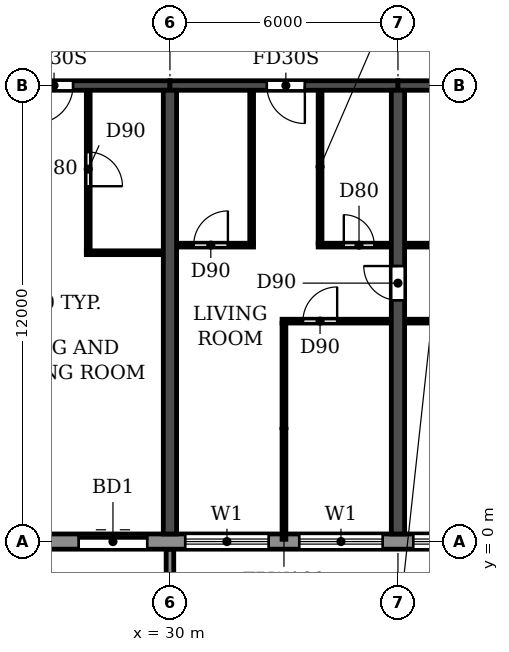
"""IFC4 building model, lengths in metres.
Left out: names, types, materials, properties, quantities, classifications, styles, units other than length and angle.
Written with IfcOpenShell. Run it as: python <this file> out.ifc"""

import sys

from ifc_helpers import new_model, si_unit, direction, frame, frame_2d, origin, place, context, subcontext, project, spatial, polyline, rectangle, outline, extrude, source, transform, mapped, element, fill, save


model = new_model("IFC4")
c1 = context("Model", 3, precision=1e-05, world=origin(), true_north=direction((0.0, 1.0)))
c2 = subcontext(c1, "Body", "Model", "MODEL_VIEW")
j1 = project(units=[si_unit("LENGTHUNIT", "METRE"), si_unit("PLANEANGLEUNIT", "RADIAN")], contexts=[c1])
p1 = place(None, origin())
s1 = spatial("IfcSite", under=j1, at=p1, CompositionType="ELEMENT")
p2 = place(p1, origin())
s2 = spatial("IfcBuilding", under=s1, at=p2, CompositionType="ELEMENT")
p3 = place(p2, frame((0.0, 0.0, 109.2)))
s3 = spatial("IfcBuildingStorey", under=s2, at=p3, CompositionType="ELEMENT", Elevation=109.2)
p4 = place(p3, frame((30.0, 0.2, 0.0), z_axis=(0.0, 0.0, 1.0), x_axis=(0.0, 1.0, 0.0)))
e1 = element("IfcWall", 1, at=p4, inside=s3, PredefinedType="SHEAR", context=c2, shape_type="SweptSolid", body=[
    extrude(rectangle(XDim=11.675, YDim=0.35, at=frame_2d((5.837, 0.0))), origin(), (0.0, 0.0, 1.0), 3.06),
])
p5 = place(p3, frame((36.0, 0.2, 0.0), z_axis=(0.0, 0.0, 1.0), x_axis=(0.0, 1.0, 0.0)))
e2 = element("IfcWall", 2, at=p5, inside=s3, PredefinedType="SHEAR", context=c2, shape_type="SweptSolid", body=[
    extrude(rectangle(XDim=11.675, YDim=0.35, at=frame_2d((5.837, 0.0))), origin(), (0.0, 0.0, 1.0), 3.06),
])
p6 = place(p5, frame((6.15, 0.0, 0.0)))
e3 = element("IfcOpeningElement", 3, at=p6, cuts=e2, PredefinedType="OPENING", context=c2, shape_type="SweptSolid", body=[
    extrude(rectangle(XDim=0.9, YDim=2.1, at=frame_2d((0.45, 1.05))), frame((0.0, 0.185, 0.0), z_axis=(0.0, -1.0, 0.0), x_axis=(1.0, 0.0, 0.0)), (0.0, 0.0, 1.0), 0.37),
])
p7 = place(p3, frame((24.0, 12.0, 0.0), z_axis=(0.0, 0.0, 1.0), x_axis=(1.0, 0.0, 0.0)))
e4 = element("IfcWall", 4, at=p7, inside=s3, PredefinedType="SHEAR", context=c2, shape_type="SweptSolid", body=[
    extrude(rectangle(XDim=6.0, YDim=0.25, at=frame_2d((3.0, 0.0))), origin(), (0.0, 0.0, 1.0), 2.46),
])
p8 = place(p7, frame((2.45, 0.0, 0.0)))
e5 = element("IfcOpeningElement", 5, at=p8, cuts=e4, PredefinedType="OPENING", context=c2, shape_type="SweptSolid", body=[
    extrude(rectangle(XDim=1.0, YDim=2.1, at=frame_2d((0.5, 1.05))), frame((0.0, 0.135, 0.0), z_axis=(0.0, -1.0, 0.0), x_axis=(1.0, 0.0, 0.0)), (0.0, 0.0, 1.0), 0.27),
])
p9 = place(p3, frame((30.0, 12.0, 0.0), z_axis=(0.0, 0.0, 1.0), x_axis=(1.0, 0.0, 0.0)))
e6 = element("IfcWall", 6, at=p9, inside=s3, PredefinedType="SHEAR", context=c2, shape_type="SweptSolid", body=[
    extrude(rectangle(XDim=6.0, YDim=0.25, at=frame_2d((3.0, 0.0))), origin(), (0.0, 0.0, 1.0), 2.46),
])
p10 = place(p9, frame((2.55, 0.0, 0.0)))
e7 = element("IfcOpeningElement", 7, at=p10, cuts=e6, PredefinedType="OPENING", context=c2, shape_type="SweptSolid", body=[
    extrude(rectangle(XDim=1.0, YDim=2.1, at=frame_2d((0.5, 1.05))), frame((0.0, 0.135, 0.0), z_axis=(0.0, -1.0, 0.0), x_axis=(1.0, 0.0, 0.0)), (0.0, 0.0, 1.0), 0.27),
])
p11 = place(p3, frame((36.0, 12.0, 0.0), z_axis=(0.0, 0.0, 1.0), x_axis=(1.0, 0.0, 0.0)))
e8 = element("IfcWall", 8, at=p11, inside=s3, PredefinedType="SHEAR", context=c2, shape_type="SweptSolid", body=[
    extrude(rectangle(XDim=6.0, YDim=0.25, at=frame_2d((3.0, 0.0))), origin(), (0.0, 0.0, 1.0), 2.46),
])
p12 = place(p3, frame((16.683, 0.0, 0.0), z_axis=(0.0, 0.0, 1.0), x_axis=(1.0, 0.0, 0.0)))
e9 = element("IfcWall", 9, at=p12, inside=s3, PredefinedType="STANDARD", context=c2, shape_type="SweptSolid", body=[
    extrude(rectangle(XDim=68.634, YDim=0.4, at=frame_2d((34.317, 0.0))), origin(), (0.0, 0.0, 1.0), 3.06),
])
p13 = place(p12, frame((1.717, 0.0, 0.9)))
e10 = element("IfcOpeningElement", 10, at=p13, cuts=e9, PredefinedType="OPENING", context=c2, shape_type="SweptSolid", body=[
    extrude(rectangle(XDim=2.2, YDim=1.5, at=frame_2d((1.1, 0.75))), frame((0.0, 0.21, 0.0), z_axis=(0.0, -1.0, 0.0), x_axis=(1.0, 0.0, 0.0)), (0.0, 0.0, 1.0), 0.42),
])
p14 = place(p12, frame((4.717, 0.0, 0.9)))
e11 = element("IfcOpeningElement", 11, at=p14, cuts=e9, PredefinedType="OPENING", context=c2, shape_type="SweptSolid", body=[
    extrude(rectangle(XDim=2.2, YDim=1.5, at=frame_2d((1.1, 0.75))), frame((0.0, 0.21, 0.0), z_axis=(0.0, -1.0, 0.0), x_axis=(1.0, 0.0, 0.0)), (0.0, 0.0, 1.0), 0.42),
])
p15 = place(p12, frame((7.717, 0.0, 0.9)))
e12 = element("IfcOpeningElement", 12, at=p15, cuts=e9, PredefinedType="OPENING", context=c2, shape_type="SweptSolid", body=[
    extrude(rectangle(XDim=2.2, YDim=1.5, at=frame_2d((1.1, 0.75))), frame((0.0, 0.21, 0.0), z_axis=(0.0, -1.0, 0.0), x_axis=(1.0, 0.0, 0.0)), (0.0, 0.0, 1.0), 0.42),
])
p16 = place(p12, frame((10.917, 0.0, 0.0)))
e13 = element("IfcOpeningElement", 13, at=p16, cuts=e9, PredefinedType="OPENING", context=c2, shape_type="SweptSolid", body=[
    extrude(rectangle(XDim=1.8, YDim=2.4, at=frame_2d((0.9, 1.2))), frame((0.0, 0.21, 0.0), z_axis=(0.0, -1.0, 0.0), x_axis=(1.0, 0.0, 0.0)), (0.0, 0.0, 1.0), 0.42),
])
p17 = place(p12, frame((13.717, 0.0, 0.9)))
e14 = element("IfcOpeningElement", 14, at=p17, cuts=e9, PredefinedType="OPENING", context=c2, shape_type="SweptSolid", body=[
    extrude(rectangle(XDim=2.2, YDim=1.5, at=frame_2d((1.1, 0.75))), frame((0.0, 0.21, 0.0), z_axis=(0.0, -1.0, 0.0), x_axis=(1.0, 0.0, 0.0)), (0.0, 0.0, 1.0), 0.42),
])
p18 = place(p12, frame((16.717, 0.0, 0.9)))
e15 = element("IfcOpeningElement", 15, at=p18, cuts=e9, PredefinedType="OPENING", context=c2, shape_type="SweptSolid", body=[
    extrude(rectangle(XDim=2.2, YDim=1.5, at=frame_2d((1.1, 0.75))), frame((0.0, 0.21, 0.0), z_axis=(0.0, -1.0, 0.0), x_axis=(1.0, 0.0, 0.0)), (0.0, 0.0, 1.0), 0.42),
])
p19 = place(p12, frame((19.717, 0.0, 0.9)))
e16 = element("IfcOpeningElement", 16, at=p19, cuts=e9, PredefinedType="OPENING", context=c2, shape_type="SweptSolid", body=[
    extrude(rectangle(XDim=2.2, YDim=1.5, at=frame_2d((1.1, 0.75))), frame((0.0, 0.21, 0.0), z_axis=(0.0, -1.0, 0.0), x_axis=(1.0, 0.0, 0.0)), (0.0, 0.0, 1.0), 0.42),
])
p20 = place(p12, frame((22.717, 0.0, 0.9)))
e17 = element("IfcOpeningElement", 17, at=p20, cuts=e9, PredefinedType="OPENING", context=c2, shape_type="SweptSolid", body=[
    extrude(rectangle(XDim=2.2, YDim=1.5, at=frame_2d((1.1, 0.75))), frame((0.0, 0.21, 0.0), z_axis=(0.0, -1.0, 0.0), x_axis=(1.0, 0.0, 0.0)), (0.0, 0.0, 1.0), 0.42),
])
p21 = place(p12, frame((25.717, 0.0, 0.9)))
e18 = element("IfcOpeningElement", 18, at=p21, cuts=e9, PredefinedType="OPENING", context=c2, shape_type="SweptSolid", body=[
    extrude(rectangle(XDim=2.2, YDim=1.5, at=frame_2d((1.1, 0.75))), frame((0.0, 0.21, 0.0), z_axis=(0.0, -1.0, 0.0), x_axis=(1.0, 0.0, 0.0)), (0.0, 0.0, 1.0), 0.42),
])
p22 = place(p12, frame((28.717, 0.0, 0.9)))
e19 = element("IfcOpeningElement", 19, at=p22, cuts=e9, PredefinedType="OPENING", context=c2, shape_type="SweptSolid", body=[
    extrude(rectangle(XDim=2.2, YDim=1.5, at=frame_2d((1.1, 0.75))), frame((0.0, 0.21, 0.0), z_axis=(0.0, -1.0, 0.0), x_axis=(1.0, 0.0, 0.0)), (0.0, 0.0, 1.0), 0.42),
])
p23 = place(p12, frame((31.917, 0.0, 0.0)))
e20 = element("IfcOpeningElement", 20, at=p23, cuts=e9, PredefinedType="OPENING", context=c2, shape_type="SweptSolid", body=[
    extrude(rectangle(XDim=1.8, YDim=2.4, at=frame_2d((0.9, 1.2))), frame((0.0, 0.21, 0.0), z_axis=(0.0, -1.0, 0.0), x_axis=(1.0, 0.0, 0.0)), (0.0, 0.0, 1.0), 0.42),
])
p24 = place(p12, frame((34.717, 0.0, 0.9)))
e21 = element("IfcOpeningElement", 21, at=p24, cuts=e9, PredefinedType="OPENING", context=c2, shape_type="SweptSolid", body=[
    extrude(rectangle(XDim=2.2, YDim=1.5, at=frame_2d((1.1, 0.75))), frame((0.0, 0.21, 0.0), z_axis=(0.0, -1.0, 0.0), x_axis=(1.0, 0.0, 0.0)), (0.0, 0.0, 1.0), 0.42),
])
p25 = place(p12, frame((37.717, 0.0, 0.9)))
e22 = element("IfcOpeningElement", 22, at=p25, cuts=e9, PredefinedType="OPENING", context=c2, shape_type="SweptSolid", body=[
    extrude(rectangle(XDim=2.2, YDim=1.5, at=frame_2d((1.1, 0.75))), frame((0.0, 0.21, 0.0), z_axis=(0.0, -1.0, 0.0), x_axis=(1.0, 0.0, 0.0)), (0.0, 0.0, 1.0), 0.42),
])
p26 = place(p12, frame((40.717, 0.0, 0.9)))
e23 = element("IfcOpeningElement", 23, at=p26, cuts=e9, PredefinedType="OPENING", context=c2, shape_type="SweptSolid", body=[
    extrude(rectangle(XDim=2.2, YDim=1.5, at=frame_2d((1.1, 0.75))), frame((0.0, 0.21, 0.0), z_axis=(0.0, -1.0, 0.0), x_axis=(1.0, 0.0, 0.0)), (0.0, 0.0, 1.0), 0.42),
])
p27 = place(p12, frame((43.717, 0.0, 0.9)))
e24 = element("IfcOpeningElement", 24, at=p27, cuts=e9, PredefinedType="OPENING", context=c2, shape_type="SweptSolid", body=[
    extrude(rectangle(XDim=2.2, YDim=1.5, at=frame_2d((1.1, 0.75))), frame((0.0, 0.21, 0.0), z_axis=(0.0, -1.0, 0.0), x_axis=(1.0, 0.0, 0.0)), (0.0, 0.0, 1.0), 0.42),
])
p28 = place(p12, frame((46.917, 0.0, 0.0)))
e25 = element("IfcOpeningElement", 25, at=p28, cuts=e9, PredefinedType="OPENING", context=c2, shape_type="SweptSolid", body=[
    extrude(rectangle(XDim=1.8, YDim=2.4, at=frame_2d((0.9, 1.2))), frame((0.0, 0.21, 0.0), z_axis=(0.0, -1.0, 0.0), x_axis=(1.0, 0.0, 0.0)), (0.0, 0.0, 1.0), 0.42),
])
p29 = place(p12, frame((49.717, 0.0, 0.9)))
e26 = element("IfcOpeningElement", 26, at=p29, cuts=e9, PredefinedType="OPENING", context=c2, shape_type="SweptSolid", body=[
    extrude(rectangle(XDim=2.2, YDim=1.5, at=frame_2d((1.1, 0.75))), frame((0.0, 0.21, 0.0), z_axis=(0.0, -1.0, 0.0), x_axis=(1.0, 0.0, 0.0)), (0.0, 0.0, 1.0), 0.42),
])
p30 = place(p12, frame((52.717, 0.0, 0.9)))
e27 = element("IfcOpeningElement", 27, at=p30, cuts=e9, PredefinedType="OPENING", context=c2, shape_type="SweptSolid", body=[
    extrude(rectangle(XDim=2.2, YDim=1.5, at=frame_2d((1.1, 0.75))), frame((0.0, 0.21, 0.0), z_axis=(0.0, -1.0, 0.0), x_axis=(1.0, 0.0, 0.0)), (0.0, 0.0, 1.0), 0.42),
])
p31 = place(p12, frame((55.717, 0.0, 0.9)))
e28 = element("IfcOpeningElement", 28, at=p31, cuts=e9, PredefinedType="OPENING", context=c2, shape_type="SweptSolid", body=[
    extrude(rectangle(XDim=2.2, YDim=1.5, at=frame_2d((1.1, 0.75))), frame((0.0, 0.21, 0.0), z_axis=(0.0, -1.0, 0.0), x_axis=(1.0, 0.0, 0.0)), (0.0, 0.0, 1.0), 0.42),
])
p32 = place(p12, frame((58.717, 0.0, 0.9)))
e29 = element("IfcOpeningElement", 29, at=p32, cuts=e9, PredefinedType="OPENING", context=c2, shape_type="SweptSolid", body=[
    extrude(rectangle(XDim=2.2, YDim=1.5, at=frame_2d((1.1, 0.75))), frame((0.0, 0.21, 0.0), z_axis=(0.0, -1.0, 0.0), x_axis=(1.0, 0.0, 0.0)), (0.0, 0.0, 1.0), 0.42),
])
p33 = place(p12, frame((61.717, 0.0, 0.9)))
e30 = element("IfcOpeningElement", 30, at=p33, cuts=e9, PredefinedType="OPENING", context=c2, shape_type="SweptSolid", body=[
    extrude(rectangle(XDim=2.2, YDim=1.5, at=frame_2d((1.1, 0.75))), frame((0.0, 0.21, 0.0), z_axis=(0.0, -1.0, 0.0), x_axis=(1.0, 0.0, 0.0)), (0.0, 0.0, 1.0), 0.42),
])
p34 = place(p12, frame((64.717, 0.0, 0.9)))
e31 = element("IfcOpeningElement", 31, at=p34, cuts=e9, PredefinedType="OPENING", context=c2, shape_type="SweptSolid", body=[
    extrude(rectangle(XDim=2.2, YDim=1.5, at=frame_2d((1.1, 0.75))), frame((0.0, 0.21, 0.0), z_axis=(0.0, -1.0, 0.0), x_axis=(1.0, 0.0, 0.0)), (0.0, 0.0, 1.0), 0.42),
])
m1 = source(origin(), c2, "Body", "SweptSolid", [
    extrude(outline(polyline([(0.0, 0.0), (0.2, 0.0), (0.2, 1.65), (0.0, 1.65), (0.0, 0.0)])), origin(), (0.0, 0.0, 1.0), 3.1),
])
p35 = place(p3, frame((29.9, -1.85, 0.0)))
e32 = element("IfcWall", 32, at=p35, inside=s3, PredefinedType="STANDARD", context=c2, shape_type="MappedRepresentation", body=[
    mapped(m1, transform((0.0, 0.0, 0.0))),
])
p36 = place(p3, frame((32.95, 5.8, 0.0), z_axis=(0.0, 0.0, 1.0), x_axis=(1.0, 0.0, 0.0)))
e33 = element("IfcWall", 33, at=p36, inside=s3, PredefinedType="PARTITIONING", context=c2, shape_type="SweptSolid", body=[
    extrude(rectangle(XDim=2.865, YDim=0.1, at=frame_2d((1.433, 0.0))), origin(), (0.0, 0.0, 1.0), 3.06),
])
p37 = place(p36, frame((0.55, 0.0, 0.0)))
e34 = element("IfcOpeningElement", 34, at=p37, cuts=e33, PredefinedType="OPENING", context=c2, shape_type="SweptSolid", body=[
    extrude(rectangle(XDim=0.9, YDim=2.1, at=frame_2d((0.45, 1.05))), frame((0.0, 0.06, 0.0), z_axis=(0.0, -1.0, 0.0), x_axis=(1.0, 0.0, 0.0)), (0.0, 0.0, 1.0), 0.12),
])
p38 = place(p3, frame((36.185, 5.8, 0.0), z_axis=(0.0, 0.0, 1.0), x_axis=(1.0, 0.0, 0.0)))
e35 = element("IfcWall", 35, at=p38, inside=s3, PredefinedType="PARTITIONING", context=c2, shape_type="SweptSolid", body=[
    extrude(rectangle(XDim=5.63, YDim=0.1, at=frame_2d((2.815, 0.0))), origin(), (0.0, 0.0, 1.0), 3.06),
])
p39 = place(p38, frame((1.415, 0.0, 0.0)))
e36 = element("IfcOpeningElement", 36, at=p39, cuts=e35, PredefinedType="OPENING", context=c2, shape_type="SweptSolid", body=[
    extrude(rectangle(XDim=0.9, YDim=2.1, at=frame_2d((0.45, 1.05))), frame((0.0, 0.06, 0.0), z_axis=(0.0, -1.0, 0.0), x_axis=(1.0, 0.0, 0.0)), (0.0, 0.0, 1.0), 0.12),
])
p40 = place(p38, frame((3.315, 0.0, 0.0)))
e37 = element("IfcOpeningElement", 37, at=p40, cuts=e35, PredefinedType="OPENING", context=c2, shape_type="SweptSolid", body=[
    extrude(rectangle(XDim=0.9, YDim=2.1, at=frame_2d((0.45, 1.05))), frame((0.0, 0.06, 0.0), z_axis=(0.0, -1.0, 0.0), x_axis=(1.0, 0.0, 0.0)), (0.0, 0.0, 1.0), 0.12),
])
p41 = place(p3, frame((27.8, 7.6, 0.0), z_axis=(0.0, 0.0, 1.0), x_axis=(1.0, 0.0, 0.0)))
e38 = element("IfcWall", 38, at=p41, inside=s3, PredefinedType="PARTITIONING", context=c2, shape_type="SweptSolid", body=[
    extrude(rectangle(XDim=2.015, YDim=0.1, at=frame_2d((1.007, 0.0))), origin(), (0.0, 0.0, 1.0), 3.06),
])
p42 = place(p3, frame((30.185, 7.8, 0.0), z_axis=(0.0, 0.0, 1.0), x_axis=(1.0, 0.0, 0.0)))
e39 = element("IfcWall", 39, at=p42, inside=s3, PredefinedType="PARTITIONING", context=c2, shape_type="SweptSolid", body=[
    extrude(rectangle(XDim=2.015, YDim=0.1, at=frame_2d((1.007, 0.0))), origin(), (0.0, 0.0, 1.0), 3.06),
])
p43 = place(p42, frame((0.44, 0.0, 0.0)))
e40 = element("IfcOpeningElement", 40, at=p43, cuts=e39, PredefinedType="OPENING", context=c2, shape_type="SweptSolid", body=[
    extrude(rectangle(XDim=0.9, YDim=2.1, at=frame_2d((0.45, 1.05))), frame((0.0, 0.06, 0.0), z_axis=(0.0, -1.0, 0.0), x_axis=(1.0, 0.0, 0.0)), (0.0, 0.0, 1.0), 0.12),
])
p44 = place(p3, frame((33.9, 7.8, 0.0), z_axis=(0.0, 0.0, 1.0), x_axis=(1.0, 0.0, 0.0)))
e41 = element("IfcWall", 41, at=p44, inside=s3, PredefinedType="PARTITIONING", context=c2, shape_type="SweptSolid", body=[
    extrude(rectangle(XDim=1.915, YDim=0.1, at=frame_2d((0.958, 0.0))), origin(), (0.0, 0.0, 1.0), 3.06),
])
p45 = place(p44, frame((0.675, 0.0, 0.0)))
e42 = element("IfcOpeningElement", 42, at=p45, cuts=e41, PredefinedType="OPENING", context=c2, shape_type="SweptSolid", body=[
    extrude(rectangle(XDim=0.8, YDim=2.1, at=frame_2d((0.4, 1.05))), frame((0.0, 0.06, 0.0), z_axis=(0.0, -1.0, 0.0), x_axis=(1.0, 0.0, 0.0)), (0.0, 0.0, 1.0), 0.12),
])
p46 = place(p3, frame((36.185, 7.8, 0.0), z_axis=(0.0, 0.0, 1.0), x_axis=(1.0, 0.0, 0.0)))
e43 = element("IfcWall", 43, at=p46, inside=s3, PredefinedType="PARTITIONING", context=c2, shape_type="SweptSolid", body=[
    extrude(rectangle(XDim=5.63, YDim=0.1, at=frame_2d((2.815, 0.0))), origin(), (0.0, 0.0, 1.0), 3.06),
])
p47 = place(p46, frame((0.765, 0.0, 0.0)))
e44 = element("IfcOpeningElement", 44, at=p47, cuts=e43, PredefinedType="OPENING", context=c2, shape_type="SweptSolid", body=[
    extrude(rectangle(XDim=0.8, YDim=2.1, at=frame_2d((0.4, 1.05))), frame((0.0, 0.06, 0.0), z_axis=(0.0, -1.0, 0.0), x_axis=(1.0, 0.0, 0.0)), (0.0, 0.0, 1.0), 0.12),
])
p48 = place(p46, frame((3.765, 0.0, 0.0)))
e45 = element("IfcOpeningElement", 45, at=p48, cuts=e43, PredefinedType="OPENING", context=c2, shape_type="SweptSolid", body=[
    extrude(rectangle(XDim=0.8, YDim=2.1, at=frame_2d((0.4, 1.05))), frame((0.0, 0.06, 0.0), z_axis=(0.0, -1.0, 0.0), x_axis=(1.0, 0.0, 0.0)), (0.0, 0.0, 1.0), 0.12),
])
p49 = place(p3, frame((27.85, 7.65, 0.0), z_axis=(0.0, 0.0, 1.0), x_axis=(0.0, 1.0, 0.0)))
e46 = element("IfcWall", 46, at=p49, inside=s3, PredefinedType="PARTITIONING", context=c2, shape_type="SweptSolid", body=[
    extrude(rectangle(XDim=4.215, YDim=0.1, at=frame_2d((2.107, 0.0))), origin(), (0.0, 0.0, 1.0), 3.06),
])
p50 = place(p49, frame((1.7, 0.0, 0.0)))
e47 = element("IfcOpeningElement", 47, at=p50, cuts=e46, PredefinedType="OPENING", context=c2, shape_type="SweptSolid", body=[
    extrude(rectangle(XDim=0.9, YDim=2.1, at=frame_2d((0.45, 1.05))), frame((0.0, 0.06, 0.0), z_axis=(0.0, -1.0, 0.0), x_axis=(1.0, 0.0, 0.0)), (0.0, 0.0, 1.0), 0.12),
])
p51 = place(p3, frame((32.15, 7.85, 0.0), z_axis=(0.0, 0.0, 1.0), x_axis=(0.0, 1.0, 0.0)))
e48 = element("IfcWall", 48, at=p51, inside=s3, PredefinedType="PARTITIONING", context=c2, shape_type="SweptSolid", body=[
    extrude(rectangle(XDim=4.015, YDim=0.1, at=frame_2d((2.007, 0.0))), origin(), (0.0, 0.0, 1.0), 3.06),
])
p52 = place(p3, frame((33.0, 0.06, 0.0), z_axis=(0.0, 0.0, 1.0), x_axis=(0.0, 1.0, 0.0)))
e49 = element("IfcWall", 49, at=p52, inside=s3, PredefinedType="PARTITIONING", context=c2, shape_type="SweptSolid", body=[
    extrude(rectangle(XDim=5.69, YDim=0.1, at=frame_2d((2.845, 0.0))), origin(), (0.0, 0.0, 1.0), 3.06),
])
p53 = place(p3, frame((33.95, 7.85, 0.0), z_axis=(0.0, 0.0, 1.0), x_axis=(0.0, 1.0, 0.0)))
e50 = element("IfcWall", 50, at=p53, inside=s3, PredefinedType="PARTITIONING", context=c2, shape_type="SweptSolid", body=[
    extrude(rectangle(XDim=4.015, YDim=0.1, at=frame_2d((2.007, 0.0))), origin(), (0.0, 0.0, 1.0), 3.06),
])
p54 = place(p16, origin())
e51 = element("IfcDoor", 51, at=p54, inside=s3, OperationType="DOUBLE_DOOR_SLIDING", PredefinedType="DOOR", context=c2, shape_type="SweptSolid", body=[
    extrude(rectangle(XDim=1.8, YDim=2.4, at=frame_2d((0.9, 1.2))), frame((0.0, 0.025, 0.0), z_axis=(0.0, -1.0, 0.0), x_axis=(1.0, 0.0, 0.0)), (0.0, 0.0, 1.0), 0.05),
])
fill(e13, e51)
p55 = place(p17, origin())
e52 = element("IfcWindow", 52, at=p55, inside=s3, PartitioningType="DOUBLE_PANEL_HORIZONTAL", PredefinedType="WINDOW", context=c2, shape_type="SweptSolid", body=[
    extrude(rectangle(XDim=2.2, YDim=1.5, at=frame_2d((1.1, 0.75))), frame((0.0, 0.03, 0.0), z_axis=(0.0, -1.0, 0.0), x_axis=(1.0, 0.0, 0.0)), (0.0, 0.0, 1.0), 0.06),
])
fill(e14, e52)
p56 = place(p18, origin())
e53 = element("IfcWindow", 53, at=p56, inside=s3, PartitioningType="DOUBLE_PANEL_HORIZONTAL", PredefinedType="WINDOW", context=c2, shape_type="SweptSolid", body=[
    extrude(rectangle(XDim=2.2, YDim=1.5, at=frame_2d((1.1, 0.75))), frame((0.0, 0.03, 0.0), z_axis=(0.0, -1.0, 0.0), x_axis=(1.0, 0.0, 0.0)), (0.0, 0.0, 1.0), 0.06),
])
fill(e15, e53)
p57 = place(p19, origin())
e54 = element("IfcWindow", 54, at=p57, inside=s3, PartitioningType="DOUBLE_PANEL_HORIZONTAL", PredefinedType="WINDOW", context=c2, shape_type="SweptSolid", body=[
    extrude(rectangle(XDim=2.2, YDim=1.5, at=frame_2d((1.1, 0.75))), frame((0.0, 0.03, 0.0), z_axis=(0.0, -1.0, 0.0), x_axis=(1.0, 0.0, 0.0)), (0.0, 0.0, 1.0), 0.06),
])
fill(e16, e54)
p58 = place(p8, frame((1.0, 0.0, 0.0), z_axis=(0.0, 0.0, 1.0), x_axis=(-1.0, 0.0, 0.0)))
e55 = element("IfcDoor", 55, at=p58, inside=s3, OperationType="SINGLE_SWING_RIGHT", PredefinedType="DOOR", context=c2, shape_type="SweptSolid", body=[
    extrude(rectangle(XDim=1.0, YDim=2.1, at=frame_2d((0.5, 1.05))), frame((0.0, 0.025, 0.0), z_axis=(0.0, -1.0, 0.0), x_axis=(1.0, 0.0, 0.0)), (0.0, 0.0, 1.0), 0.05),
])
fill(e5, e55)
p59 = place(p50, frame((0.9, 0.0, 0.0), z_axis=(0.0, 0.0, 1.0), x_axis=(-1.0, 0.0, 0.0)))
e56 = element("IfcDoor", 56, at=p59, inside=s3, OperationType="SINGLE_SWING_RIGHT", PredefinedType="DOOR", context=c2, shape_type="SweptSolid", body=[
    extrude(rectangle(XDim=0.9, YDim=2.1, at=frame_2d((0.45, 1.05))), frame((0.0, 0.025, 0.0), z_axis=(0.0, -1.0, 0.0), x_axis=(1.0, 0.0, 0.0)), (0.0, 0.0, 1.0), 0.05),
])
fill(e47, e56)
p60 = place(p43, origin())
e57 = element("IfcDoor", 57, at=p60, inside=s3, OperationType="SINGLE_SWING_RIGHT", PredefinedType="DOOR", context=c2, shape_type="SweptSolid", body=[
    extrude(rectangle(XDim=0.9, YDim=2.1, at=frame_2d((0.45, 1.05))), frame((0.0, 0.025, 0.0), z_axis=(0.0, -1.0, 0.0), x_axis=(1.0, 0.0, 0.0)), (0.0, 0.0, 1.0), 0.05),
])
fill(e40, e57)
p61 = place(p10, frame((1.0, 0.0, 0.0), z_axis=(0.0, 0.0, 1.0), x_axis=(-1.0, 0.0, 0.0)))
e58 = element("IfcDoor", 58, at=p61, inside=s3, OperationType="SINGLE_SWING_LEFT", PredefinedType="DOOR", context=c2, shape_type="SweptSolid", body=[
    extrude(rectangle(XDim=1.0, YDim=2.1, at=frame_2d((0.5, 1.05))), frame((0.0, 0.025, 0.0), z_axis=(0.0, -1.0, 0.0), x_axis=(1.0, 0.0, 0.0)), (0.0, 0.0, 1.0), 0.05),
])
fill(e7, e58)
p62 = place(p37, origin())
e59 = element("IfcDoor", 59, at=p62, inside=s3, OperationType="SINGLE_SWING_RIGHT", PredefinedType="DOOR", context=c2, shape_type="SweptSolid", body=[
    extrude(rectangle(XDim=0.9, YDim=2.1, at=frame_2d((0.45, 1.05))), frame((0.0, 0.025, 0.0), z_axis=(0.0, -1.0, 0.0), x_axis=(1.0, 0.0, 0.0)), (0.0, 0.0, 1.0), 0.05),
])
fill(e34, e59)
p63 = place(p45, origin())
e60 = element("IfcDoor", 60, at=p63, inside=s3, OperationType="SINGLE_SWING_LEFT", PredefinedType="DOOR", context=c2, shape_type="SweptSolid", body=[
    extrude(rectangle(XDim=0.8, YDim=2.1, at=frame_2d((0.4, 1.05))), frame((0.0, 0.025, 0.0), z_axis=(0.0, -1.0, 0.0), x_axis=(1.0, 0.0, 0.0)), (0.0, 0.0, 1.0), 0.05),
])
fill(e42, e60)
p64 = place(p6, origin())
e61 = element("IfcDoor", 61, at=p64, inside=s3, OperationType="SINGLE_SWING_RIGHT", PredefinedType="DOOR", context=c2, shape_type="SweptSolid", body=[
    extrude(rectangle(XDim=0.9, YDim=2.1, at=frame_2d((0.45, 1.05))), frame((0.0, 0.025, 0.0), z_axis=(0.0, -1.0, 0.0), x_axis=(1.0, 0.0, 0.0)), (0.0, 0.0, 1.0), 0.05),
])
fill(e3, e61)
save(model, sys.argv[1])
